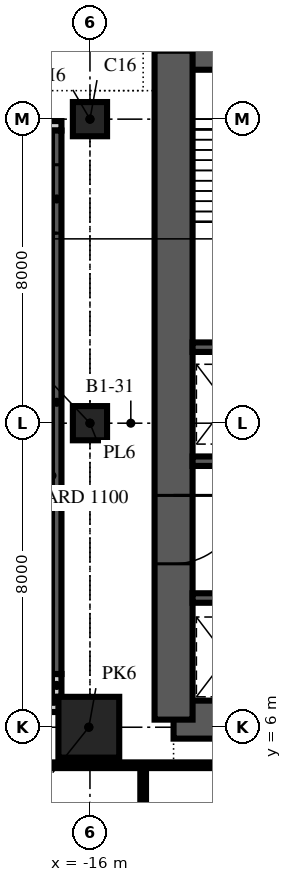
"""IFC4 building model, lengths in metres.
Left out: names, types, materials, properties, quantities, classifications, styles, units other than length and angle.
Written with IfcOpenShell. Run it as: python <this file> out.ifc"""

import sys

from ifc_helpers import new_model, si_unit, direction, frame, frame_2d, origin, origin_2d, place, context, subcontext, project, spatial, polyline, rectangle, outline, extrude, element, fill, save


model = new_model("IFC4")
c1 = context("Model", 3, precision=1e-05, world=origin(), true_north=direction((0.0, 1.0)))
c2 = subcontext(c1, "Body", "Model", "MODEL_VIEW")
j1 = project(units=[si_unit("LENGTHUNIT", "METRE"), si_unit("PLANEANGLEUNIT", "RADIAN")], contexts=[c1])
p1 = place(None, origin())
s1 = spatial("IfcSite", under=j1, at=p1, CompositionType="ELEMENT")
p2 = place(p1, origin())
s2 = spatial("IfcBuilding", under=s1, at=p2, CompositionType="ELEMENT")
p3 = place(p2, frame((0.0, 0.0, -7.0)))
s3 = spatial("IfcBuildingStorey", under=s2, at=p3, CompositionType="ELEMENT", Elevation=-7.0)
p4 = place(p3, frame((-16.03, 6.0, -0.6), z_axis=(0.0, 0.0, 1.0), x_axis=(1.0, 0.0, 0.0)))
e1 = element("IfcColumn", 1, at=p4, inside=s3, PredefinedType="COLUMN", context=c2, shape_type="SweptSolid", body=[
    extrude(rectangle(XDim=1.6, YDim=1.6, at=origin_2d()), origin(), (0.0, 0.0, 1.0), 7.6),
])
for number, where, z_axis, x_axis in (
    (2, (-16.0, 14.0, -0.6), (0.0, 0.0, 1.0), (1.0, 0.0, 0.0)),
    (3, (-16.0, 22.0, -0.6), (0.0, 0.0, 1.0), (1.0, 0.0, 0.0)),
):
    element("IfcColumn", number, at=place(p3, frame(where, z_axis=z_axis, x_axis=x_axis)), inside=s3, PredefinedType="COLUMN", context=c2, shape_type="SweptSolid", body=[
        extrude(rectangle(XDim=0.9, YDim=0.9, at=origin_2d()), origin(), (0.0, 0.0, 1.0), 7.6),
    ])
p5 = place(p3, frame((-13.8, 6.2, 0.0), z_axis=(0.0, 0.0, 1.0), x_axis=(1.0, 0.0, 0.0)))
e4 = element("IfcWall", 4, at=p5, inside=s3, PredefinedType="SHEAR", context=c2, shape_type="SweptSolid", body=[
    extrude(rectangle(XDim=27.6, YDim=1.0, at=frame_2d((13.8, 0.0))), origin(), (0.0, 0.0, 1.0), 7.0),
])
p6 = place(p3, frame((13.8, 23.8, 0.0), z_axis=(0.0, 0.0, 1.0), x_axis=(-1.0, 0.0, 0.0)))
e5 = element("IfcWall", 5, at=p6, inside=s3, PredefinedType="SHEAR", context=c2, shape_type="SweptSolid", body=[
    extrude(rectangle(XDim=27.6, YDim=1.0, at=frame_2d((13.8, 0.0))), origin(), (0.0, 0.0, 1.0), 7.0),
])
p7 = place(p6, frame((21.7, 0.0, 0.0)))
e6 = element("IfcOpeningElement", 6, at=p7, cuts=e5, PredefinedType="OPENING", context=c2, shape_type="SweptSolid", body=[
    extrude(rectangle(XDim=1.0, YDim=2.1, at=frame_2d((0.5, 1.05))), frame((0.0, 0.515, 0.0), z_axis=(0.0, -1.0, 0.0), x_axis=(1.0, 0.0, 0.0)), (0.0, 0.0, 1.0), 1.03),
])
p8 = place(p6, frame((4.9, 0.0, 0.0)))
e7 = element("IfcOpeningElement", 7, at=p8, cuts=e5, PredefinedType="OPENING", context=c2, shape_type="SweptSolid", body=[
    extrude(rectangle(XDim=1.0, YDim=2.1, at=frame_2d((0.5, 1.05))), frame((0.0, 0.515, 0.0), z_axis=(0.0, -1.0, 0.0), x_axis=(1.0, 0.0, 0.0)), (0.0, 0.0, 1.0), 1.03),
])
p9 = place(p6, frame((17.3, 0.0, 0.0)))
e8 = element("IfcOpeningElement", 8, at=p9, cuts=e5, PredefinedType="OPENING", context=c2, shape_type="SweptSolid", body=[
    extrude(rectangle(XDim=1.0, YDim=2.1, at=frame_2d((0.5, 1.05))), frame((0.0, 0.515, 0.0), z_axis=(0.0, -1.0, 0.0), x_axis=(1.0, 0.0, 0.0)), (0.0, 0.0, 1.0), 1.03),
])
p10 = place(p6, frame((13.3, 0.0, 0.0)))
e9 = element("IfcOpeningElement", 9, at=p10, cuts=e5, PredefinedType="OPENING", context=c2, shape_type="SweptSolid", body=[
    extrude(rectangle(XDim=1.0, YDim=2.1, at=frame_2d((0.5, 1.05))), frame((0.0, 0.515, 0.0), z_axis=(0.0, -1.0, 0.0), x_axis=(1.0, 0.0, 0.0)), (0.0, 0.0, 1.0), 1.03),
])
p11 = place(p6, frame((9.3, 0.0, 0.0)))
e10 = element("IfcOpeningElement", 10, at=p11, cuts=e5, PredefinedType="OPENING", context=c2, shape_type="SweptSolid", body=[
    extrude(rectangle(XDim=1.0, YDim=2.1, at=frame_2d((0.5, 1.05))), frame((0.0, 0.515, 0.0), z_axis=(0.0, -1.0, 0.0), x_axis=(1.0, 0.0, 0.0)), (0.0, 0.0, 1.0), 1.03),
])
p12 = place(p3, frame((-13.8, 23.8, 0.0), z_axis=(0.0, 0.0, 1.0), x_axis=(0.0, -1.0, 0.0)))
e11 = element("IfcWall", 11, at=p12, inside=s3, PredefinedType="SHEAR", context=c2, shape_type="SweptSolid", body=[
    extrude(outline(polyline([(0.0, -0.5), (17.6, -0.5), (17.6, 0.0), (17.1, 0.0), (17.1, 0.5), (0.5, 0.5), (0.5, 0.0), (0.0, 0.0), (0.0, -0.5)])), origin(), (0.0, 0.0, 1.0), 7.0),
])
p13 = place(p12, frame((11.7, 0.0, 0.0)))
e12 = element("IfcOpeningElement", 12, at=p13, cuts=e11, PredefinedType="OPENING", context=c2, shape_type="SweptSolid", body=[
    extrude(rectangle(XDim=1.8, YDim=2.4, at=frame_2d((0.9, 1.2))), frame((0.0, 0.515, 0.0), z_axis=(0.0, -1.0, 0.0), x_axis=(1.0, 0.0, 0.0)), (0.0, 0.0, 1.0), 1.03),
])
p14 = place(p3, frame((-13.3, 9.4, 0.0), z_axis=(0.0, 0.0, 1.0), x_axis=(1.0, 0.0, 0.0)))
e13 = element("IfcWall", 13, at=p14, inside=s3, PredefinedType="SHEAR", context=c2, shape_type="SweptSolid", body=[
    extrude(rectangle(XDim=26.6, YDim=0.25, at=frame_2d((13.3, 0.0))), origin(), (0.0, 0.0, 1.0), 7.0),
])
p15 = place(p3, frame((-13.3, 13.0, 0.0), z_axis=(0.0, 0.0, 1.0), x_axis=(1.0, 0.0, 0.0)))
e14 = element("IfcWall", 14, at=p15, inside=s3, PredefinedType="SHEAR", context=c2, shape_type="SweptSolid", body=[
    extrude(rectangle(XDim=26.6, YDim=0.25, at=frame_2d((13.3, 0.0))), origin(), (0.0, 0.0, 1.0), 7.0),
])
p16 = place(p15, frame((16.45, 0.0, 0.0)))
e15 = element("IfcOpeningElement", 15, at=p16, cuts=e14, PredefinedType="OPENING", context=c2, shape_type="SweptSolid", body=[
    extrude(rectangle(XDim=0.9, YDim=2.1, at=frame_2d((0.45, 1.05))), frame((0.0, 0.14, 0.0), z_axis=(0.0, -1.0, 0.0), x_axis=(1.0, 0.0, 0.0)), (0.0, 0.0, 1.0), 0.28),
])
p17 = place(p15, frame((20.85, 0.0, 0.0)))
e16 = element("IfcOpeningElement", 16, at=p17, cuts=e14, PredefinedType="OPENING", context=c2, shape_type="SweptSolid", body=[
    extrude(rectangle(XDim=0.9, YDim=2.1, at=frame_2d((0.45, 1.05))), frame((0.0, 0.14, 0.0), z_axis=(0.0, -1.0, 0.0), x_axis=(1.0, 0.0, 0.0)), (0.0, 0.0, 1.0), 0.28),
])
p18 = place(p3, frame((-13.3, 16.0, 0.0), z_axis=(0.0, 0.0, 1.0), x_axis=(1.0, 0.0, 0.0)))
e17 = element("IfcWall", 17, at=p18, inside=s3, PredefinedType="SHEAR", context=c2, shape_type="SweptSolid", body=[
    extrude(rectangle(XDim=26.6, YDim=0.25, at=frame_2d((13.3, 0.0))), origin(), (0.0, 0.0, 1.0), 7.0),
])
p19 = place(p3, frame((-23.15, 6.525, 0.0), z_axis=(0.0, 0.0, 1.0), x_axis=(1.0, 0.0, 0.0)))
e18 = element("IfcWall", 18, at=p19, inside=s3, PredefinedType="SOLIDWALL", context=c2, shape_type="SweptSolid", body=[
    extrude(rectangle(XDim=6.35, YDim=0.25, at=frame_2d((3.175, 0.0))), origin(), (0.0, 0.0, 1.0), 6.05),
])
p20 = place(p3, frame((-16.75, 21.825, 0.0), z_axis=(0.0, 0.0, 1.0), x_axis=(-1.0, 0.0, 0.0)))
e19 = element("IfcWall", 19, at=p20, inside=s3, PredefinedType="SOLIDWALL", context=c2, shape_type="SweptSolid", body=[
    extrude(rectangle(XDim=6.4, YDim=0.25, at=frame_2d((3.2, 0.0))), origin(), (0.0, 0.0, 1.0), 7.0),
])
p21 = place(p3, frame((-16.875, 6.8, 0.0), z_axis=(0.0, 0.0, 1.0), x_axis=(0.0, 1.0, 0.0)))
e20 = element("IfcWall", 20, at=p21, inside=s3, PredefinedType="SOLIDWALL", context=c2, shape_type="SweptSolid", body=[
    extrude(rectangle(XDim=0.6, YDim=0.25, at=frame_2d((0.3, 0.0))), origin(), (0.0, 0.0, 1.0), 7.0),
])
p22 = place(p3, frame((-16.875, 7.4, 0.0), z_axis=(0.0, 0.0, 1.0), x_axis=(0.0, 1.0, 0.0)))
e21 = element("IfcWall", 21, at=p22, inside=s3, PredefinedType="SOLIDWALL", context=c2, shape_type="SweptSolid", body=[
    extrude(rectangle(XDim=14.3, YDim=0.25, at=frame_2d((7.15, 0.0))), origin(), (0.0, 0.0, 1.0), 7.0),
])
p23 = place(p22, frame((11.6, 0.0, 0.0)))
e22 = element("IfcOpeningElement", 22, at=p23, cuts=e21, PredefinedType="OPENING", context=c2, shape_type="SweptSolid", body=[
    extrude(rectangle(XDim=1.8, YDim=2.1, at=frame_2d((0.9, 1.05))), frame((0.0, 0.14, 0.0), z_axis=(0.0, -1.0, 0.0), x_axis=(1.0, 0.0, 0.0)), (0.0, 0.0, 1.0), 0.28),
])
p24 = place(p3, frame((-14.6, -4.44, 0.0), z_axis=(0.0, 0.0, 1.0), x_axis=(0.0, 1.0, 0.0)))
e23 = element("IfcWall", 23, at=p24, inside=s3, PredefinedType="PARTITIONING", context=c2, shape_type="SweptSolid", body=[
    extrude(rectangle(XDim=9.44, YDim=0.15, at=frame_2d((4.72, 0.0))), origin(), (0.0, 0.0, 1.0), 6.7),
])
p25 = place(p24, frame((4.22, 0.0, 0.0)))
e24 = element("IfcOpeningElement", 24, at=p25, cuts=e23, PredefinedType="OPENING", context=c2, shape_type="SweptSolid", body=[
    extrude(rectangle(XDim=1.0, YDim=2.1, at=frame_2d((0.5, 1.05))), frame((0.0, 0.09, 0.0), z_axis=(0.0, -1.0, 0.0), x_axis=(1.0, 0.0, 0.0)), (0.0, 0.0, 1.0), 0.18),
])
p26 = place(p3, frame((-26.331, 5.0, 0.0), z_axis=(0.0, 0.0, 1.0), x_axis=(1.0, 0.0, 0.0)))
e25 = element("IfcWall", 25, at=p26, inside=s3, PredefinedType="PARTITIONING", context=c2, shape_type="SweptSolid", body=[
    extrude(rectangle(XDim=52.662, YDim=0.15, at=frame_2d((26.331, 0.0))), origin(), (0.0, 0.0, 1.0), 6.7),
])
p27 = place(p13, origin())
e26 = element("IfcDoor", 26, at=p27, inside=s3, OperationType="DOUBLE_DOOR_SINGLE_SWING", PredefinedType="DOOR", context=c2, shape_type="SweptSolid", body=[
    extrude(rectangle(XDim=1.8, YDim=2.4, at=frame_2d((0.9, 1.2))), frame((0.0, 0.5, 0.0), z_axis=(0.0, -1.0, 0.0), x_axis=(1.0, 0.0, 0.0)), (0.0, 0.0, 1.0), 1.0),
])
fill(e12, e26)
p28 = place(p23, origin())
e27 = element("IfcDoor", 27, at=p28, inside=s3, OperationType="DOUBLE_DOOR_SINGLE_SWING", PredefinedType="DOOR", context=c2, shape_type="SweptSolid", body=[
    extrude(rectangle(XDim=1.8, YDim=2.1, at=frame_2d((0.9, 1.05))), frame((0.0, 0.125, 0.0), z_axis=(0.0, -1.0, 0.0), x_axis=(1.0, 0.0, 0.0)), (0.0, 0.0, 1.0), 0.25),
])
fill(e22, e27)
save(model, sys.argv[1])
